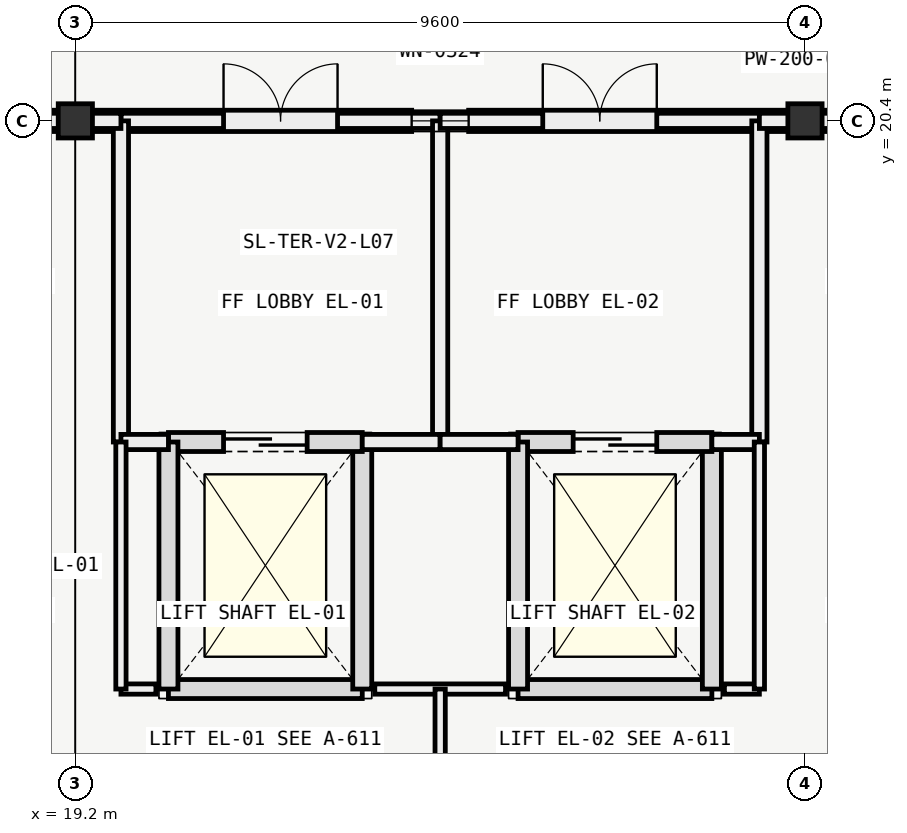
"""IFC4 building model, lengths in metres.
Left out: names, types, materials, properties, quantities, classifications, styles, units other than length and angle.
Written with IfcOpenShell. Run it as: python <this file> out.ifc"""

import sys

from ifc_helpers import new_model, si_unit, direction, frame, frame_2d, origin, origin_2d, place, context, subcontext, project, spatial, rectangle, extrude, element, fill, save


model = new_model("IFC4")
c1 = context("Model", 3, precision=1e-05, world=origin(), true_north=direction((0.0, 1.0)))
c2 = subcontext(c1, "Body", "Model", "MODEL_VIEW")
j1 = project(units=[si_unit("LENGTHUNIT", "METRE"), si_unit("PLANEANGLEUNIT", "RADIAN")], contexts=[c1])
p1 = place(None, origin())
s1 = spatial("IfcSite", under=j1, at=p1, CompositionType="ELEMENT")
p2 = place(p1, origin())
s2 = spatial("IfcBuilding", under=s1, at=p2, CompositionType="ELEMENT")
p3 = place(p2, frame((0.0, 0.0, 30.6)))
s3 = spatial("IfcBuildingStorey", under=s2, at=p3, CompositionType="ELEMENT", Elevation=30.6)
for number, where, z_axis, x_axis in (
    (1, (19.2, 20.4, 0.0), (0.0, 0.0, 1.0), (1.0, 0.0, 0.0)),
    (2, (28.8, 20.4, 0.0), (0.0, 0.0, 1.0), (1.0, 0.0, 0.0)),
):
    element("IfcColumn", number, at=place(p3, frame(where, z_axis=z_axis, x_axis=x_axis)), inside=s3, PredefinedType="COLUMN", context=c2, shape_type="SweptSolid", body=[
        extrude(rectangle(XDim=0.45, YDim=0.45, at=origin_2d()), origin(), (0.0, 0.0, 1.0), 4.2),
    ])
p4 = place(p3, frame((19.2, 20.4, 4.2), z_axis=(0.0, 0.0, 1.0), x_axis=(-1.0, 0.0, 0.0)))
e3 = element("IfcWall", 3, at=p4, inside=s3, PredefinedType="SOLIDWALL", context=c2, shape_type="SweptSolid", body=[
    extrude(rectangle(XDim=9.6, YDim=0.28, at=frame_2d((4.8, 0.0))), origin(), (0.0, 0.0, 1.0), 2.279),
])
p5 = place(p4, frame((4.425, 0.0, 0.25)))
e4 = element("IfcOpeningElement", 4, at=p5, cuts=e3, PredefinedType="OPENING", context=c2, shape_type="SweptSolid", body=[
    extrude(rectangle(XDim=0.75, YDim=1.1, at=frame_2d((0.375, 0.55))), frame((0.0, 0.15, 0.0), z_axis=(0.0, -1.0, 0.0), x_axis=(1.0, 0.0, 0.0)), (0.0, 0.0, 1.0), 0.3),
])
p6 = place(p3, frame((28.8, 20.4, 4.2), z_axis=(0.0, 0.0, 1.0), x_axis=(-1.0, 0.0, 0.0)))
e5 = element("IfcWall", 5, at=p6, inside=s3, PredefinedType="SOLIDWALL", context=c2, shape_type="SweptSolid", body=[
    extrude(rectangle(XDim=9.6, YDim=0.28, at=frame_2d((4.8, 0.0))), origin(), (0.0, 0.0, 1.0), 2.279),
])
p7 = place(p6, frame((4.425, 0.0, 0.25)))
e6 = element("IfcOpeningElement", 6, at=p7, cuts=e5, PredefinedType="OPENING", context=c2, shape_type="SweptSolid", body=[
    extrude(rectangle(XDim=0.75, YDim=1.1, at=frame_2d((0.375, 0.55))), frame((0.0, 0.15, 0.0), z_axis=(0.0, -1.0, 0.0), x_axis=(1.0, 0.0, 0.0)), (0.0, 0.0, 1.0), 0.3),
])
p8 = place(p3, frame((38.4, 20.4, 4.2), z_axis=(0.0, 0.0, 1.0), x_axis=(-1.0, 0.0, 0.0)))
e7 = element("IfcWall", 7, at=p8, inside=s3, PredefinedType="SOLIDWALL", context=c2, shape_type="SweptSolid", body=[
    extrude(rectangle(XDim=9.6, YDim=0.28, at=frame_2d((4.8, 0.0))), origin(), (0.0, 0.0, 1.0), 2.279),
])
p9 = place(p8, frame((4.425, 0.0, 0.25)))
e8 = element("IfcOpeningElement", 8, at=p9, cuts=e7, PredefinedType="OPENING", context=c2, shape_type="SweptSolid", body=[
    extrude(rectangle(XDim=0.75, YDim=1.1, at=frame_2d((0.375, 0.55))), frame((0.0, 0.15, 0.0), z_axis=(0.0, -1.0, 0.0), x_axis=(1.0, 0.0, 0.0)), (0.0, 0.0, 1.0), 0.3),
])
p10 = place(p3, frame((20.425, 12.925, 0.0), z_axis=(0.0, 0.0, 1.0), x_axis=(1.0, 0.0, 0.0)))
e9 = element("IfcWall", 9, at=p10, inside=s3, PredefinedType="SOLIDWALL", context=c2, shape_type="SweptSolid", body=[
    extrude(rectangle(XDim=2.55, YDim=0.25, at=frame_2d((1.275, 0.0))), origin(), (0.0, 0.0, 1.0), 3.4),
])
p11 = place(p3, frame((22.975, 12.925, 0.0), z_axis=(0.0, 0.0, 1.0), x_axis=(0.0, 1.0, 0.0)))
e10 = element("IfcWall", 10, at=p11, inside=s3, PredefinedType="SOLIDWALL", context=c2, shape_type="SweptSolid", body=[
    extrude(rectangle(XDim=3.25, YDim=0.25, at=frame_2d((1.625, 0.0))), origin(), (0.0, 0.0, 1.0), 3.4),
])
p12 = place(p3, frame((22.975, 16.175, 0.0), z_axis=(0.0, 0.0, 1.0), x_axis=(-1.0, 0.0, 0.0)))
e11 = element("IfcWall", 11, at=p12, inside=s3, PredefinedType="SOLIDWALL", context=c2, shape_type="SweptSolid", body=[
    extrude(rectangle(XDim=2.55, YDim=0.25, at=frame_2d((1.275, 0.0))), origin(), (0.0, 0.0, 1.0), 3.4),
])
p13 = place(p12, frame((0.725, 0.0, 0.0)))
e12 = element("IfcOpeningElement", 12, at=p13, cuts=e11, PredefinedType="OPENING", context=c2, shape_type="SweptSolid", body=[
    extrude(rectangle(XDim=1.1, YDim=2.1, at=frame_2d((0.55, 1.05))), frame((0.0, 0.135, 0.0), z_axis=(0.0, -1.0, 0.0), x_axis=(1.0, 0.0, 0.0)), (0.0, 0.0, 1.0), 0.27),
])
p14 = place(p3, frame((20.425, 16.175, 0.0), z_axis=(0.0, 0.0, 1.0), x_axis=(0.0, -1.0, 0.0)))
e13 = element("IfcWall", 13, at=p14, inside=s3, PredefinedType="SOLIDWALL", context=c2, shape_type="SweptSolid", body=[
    extrude(rectangle(XDim=3.25, YDim=0.25, at=frame_2d((1.625, 0.0))), origin(), (0.0, 0.0, 1.0), 3.4),
])
p15 = place(p3, frame((19.8, 20.4, 0.0), z_axis=(0.0, 0.0, 1.0), x_axis=(1.0, 0.0, 0.0)))
e14 = element("IfcWall", 14, at=p15, inside=s3, PredefinedType="PARTITIONING", context=c2, shape_type="SweptSolid", body=[
    extrude(rectangle(XDim=4.2, YDim=0.2, at=frame_2d((2.1, 0.0))), origin(), (0.0, 0.0, 1.0), 3.55),
])
p16 = place(p15, frame((1.35, 0.0, 0.0)))
e15 = element("IfcOpeningElement", 15, at=p16, cuts=e14, PredefinedType="OPENING", context=c2, shape_type="SweptSolid", body=[
    extrude(rectangle(XDim=1.5, YDim=2.2, at=frame_2d((0.75, 1.1))), frame((0.0, 0.11, 0.0), z_axis=(0.0, -1.0, 0.0), x_axis=(1.0, 0.0, 0.0)), (0.0, 0.0, 1.0), 0.22),
])
for number, where, z_axis, x_axis in (
    (16, (19.8, 16.175, 0.0), (0.0, 0.0, 1.0), (0.0, 1.0, 0.0)),
    (17, (24.0, 16.175, 0.0), (0.0, 0.0, 1.0), (0.0, 1.0, 0.0)),
):
    element("IfcWall", number, at=place(p3, frame(where, z_axis=z_axis, x_axis=x_axis)), inside=s3, PredefinedType="PARTITIONING", context=c2, shape_type="SweptSolid", body=[
        extrude(rectangle(XDim=4.225, YDim=0.2, at=frame_2d((2.112, 0.0))), origin(), (0.0, 0.0, 1.0), 3.55),
    ])
p17 = place(p3, frame((19.8, 16.175, 0.0), z_axis=(0.0, 0.0, 1.0), x_axis=(1.0, 0.0, 0.0)))
e18 = element("IfcWall", 18, at=p17, inside=s3, PredefinedType="PARTITIONING", context=c2, shape_type="SweptSolid", body=[
    extrude(rectangle(XDim=0.625, YDim=0.2, at=frame_2d((0.312, 0.0))), origin(), (0.0, 0.0, 1.0), 3.55),
])
p18 = place(p3, frame((22.975, 16.175, 0.0), z_axis=(0.0, 0.0, 1.0), x_axis=(1.0, 0.0, 0.0)))
e19 = element("IfcWall", 19, at=p18, inside=s3, PredefinedType="PARTITIONING", context=c2, shape_type="SweptSolid", body=[
    extrude(rectangle(XDim=1.025, YDim=0.2, at=frame_2d((0.512, 0.0))), origin(), (0.0, 0.0, 1.0), 3.55),
])
p19 = place(p3, frame((25.025, 12.925, 0.0), z_axis=(0.0, 0.0, 1.0), x_axis=(1.0, 0.0, 0.0)))
e20 = element("IfcWall", 20, at=p19, inside=s3, PredefinedType="SOLIDWALL", context=c2, shape_type="SweptSolid", body=[
    extrude(rectangle(XDim=2.55, YDim=0.25, at=frame_2d((1.275, 0.0))), origin(), (0.0, 0.0, 1.0), 3.4),
])
p20 = place(p3, frame((27.575, 12.925, 0.0), z_axis=(0.0, 0.0, 1.0), x_axis=(0.0, 1.0, 0.0)))
e21 = element("IfcWall", 21, at=p20, inside=s3, PredefinedType="SOLIDWALL", context=c2, shape_type="SweptSolid", body=[
    extrude(rectangle(XDim=3.25, YDim=0.25, at=frame_2d((1.625, 0.0))), origin(), (0.0, 0.0, 1.0), 3.4),
])
p21 = place(p3, frame((27.575, 16.175, 0.0), z_axis=(0.0, 0.0, 1.0), x_axis=(-1.0, 0.0, 0.0)))
e22 = element("IfcWall", 22, at=p21, inside=s3, PredefinedType="SOLIDWALL", context=c2, shape_type="SweptSolid", body=[
    extrude(rectangle(XDim=2.55, YDim=0.25, at=frame_2d((1.275, 0.0))), origin(), (0.0, 0.0, 1.0), 3.4),
])
p22 = place(p21, frame((0.725, 0.0, 0.0)))
e23 = element("IfcOpeningElement", 23, at=p22, cuts=e22, PredefinedType="OPENING", context=c2, shape_type="SweptSolid", body=[
    extrude(rectangle(XDim=1.1, YDim=2.1, at=frame_2d((0.55, 1.05))), frame((0.0, 0.135, 0.0), z_axis=(0.0, -1.0, 0.0), x_axis=(1.0, 0.0, 0.0)), (0.0, 0.0, 1.0), 0.27),
])
p23 = place(p3, frame((25.025, 16.175, 0.0), z_axis=(0.0, 0.0, 1.0), x_axis=(0.0, -1.0, 0.0)))
e24 = element("IfcWall", 24, at=p23, inside=s3, PredefinedType="SOLIDWALL", context=c2, shape_type="SweptSolid", body=[
    extrude(rectangle(XDim=3.25, YDim=0.25, at=frame_2d((1.625, 0.0))), origin(), (0.0, 0.0, 1.0), 3.4),
])
p24 = place(p3, frame((24.0, 20.4, 0.0), z_axis=(0.0, 0.0, 1.0), x_axis=(1.0, 0.0, 0.0)))
e25 = element("IfcWall", 25, at=p24, inside=s3, PredefinedType="PARTITIONING", context=c2, shape_type="SweptSolid", body=[
    extrude(rectangle(XDim=4.2, YDim=0.2, at=frame_2d((2.1, 0.0))), origin(), (0.0, 0.0, 1.0), 3.55),
])
p25 = place(p24, frame((1.35, 0.0, 0.0)))
e26 = element("IfcOpeningElement", 26, at=p25, cuts=e25, PredefinedType="OPENING", context=c2, shape_type="SweptSolid", body=[
    extrude(rectangle(XDim=1.5, YDim=2.2, at=frame_2d((0.75, 1.1))), frame((0.0, 0.11, 0.0), z_axis=(0.0, -1.0, 0.0), x_axis=(1.0, 0.0, 0.0)), (0.0, 0.0, 1.0), 0.22),
])
p26 = place(p3, frame((28.2, 16.175, 0.0), z_axis=(0.0, 0.0, 1.0), x_axis=(0.0, 1.0, 0.0)))
e27 = element("IfcWall", 27, at=p26, inside=s3, PredefinedType="PARTITIONING", context=c2, shape_type="SweptSolid", body=[
    extrude(rectangle(XDim=4.225, YDim=0.2, at=frame_2d((2.112, 0.0))), origin(), (0.0, 0.0, 1.0), 3.55),
])
p27 = place(p3, frame((24.0, 16.175, 0.0), z_axis=(0.0, 0.0, 1.0), x_axis=(1.0, 0.0, 0.0)))
e28 = element("IfcWall", 28, at=p27, inside=s3, PredefinedType="PARTITIONING", context=c2, shape_type="SweptSolid", body=[
    extrude(rectangle(XDim=1.025, YDim=0.2, at=frame_2d((0.512, 0.0))), origin(), (0.0, 0.0, 1.0), 3.55),
])
p28 = place(p3, frame((27.575, 16.175, 0.0), z_axis=(0.0, 0.0, 1.0), x_axis=(1.0, 0.0, 0.0)))
e29 = element("IfcWall", 29, at=p28, inside=s3, PredefinedType="PARTITIONING", context=c2, shape_type="SweptSolid", body=[
    extrude(rectangle(XDim=0.625, YDim=0.2, at=frame_2d((0.312, 0.0))), origin(), (0.0, 0.0, 1.0), 3.55),
])
p29 = place(p3, frame((19.8, 12.925, 0.0), z_axis=(0.0, 0.0, 1.0), x_axis=(1.0, 0.0, 0.0)))
e30 = element("IfcWall", 30, at=p29, inside=s3, PredefinedType="PARTITIONING", context=c2, shape_type="SweptSolid", body=[
    extrude(rectangle(XDim=0.46, YDim=0.135, at=frame_2d((0.23, 0.0))), origin(), (0.0, 0.0, 1.0), 3.85),
])
p30 = place(p3, frame((23.14, 12.925, 0.0), z_axis=(0.0, 0.0, 1.0), x_axis=(1.0, 0.0, 0.0)))
e31 = element("IfcWall", 31, at=p30, inside=s3, PredefinedType="PARTITIONING", context=c2, shape_type="SweptSolid", body=[
    extrude(rectangle(XDim=1.72, YDim=0.135, at=frame_2d((0.86, 0.0))), origin(), (0.0, 0.0, 1.0), 3.85),
])
p31 = place(p3, frame((27.74, 12.925, 0.0), z_axis=(0.0, 0.0, 1.0), x_axis=(1.0, 0.0, 0.0)))
e32 = element("IfcWall", 32, at=p31, inside=s3, PredefinedType="PARTITIONING", context=c2, shape_type="SweptSolid", body=[
    extrude(rectangle(XDim=0.46, YDim=0.135, at=frame_2d((0.23, 0.0))), origin(), (0.0, 0.0, 1.0), 3.85),
])
p32 = place(p3, frame((19.8, 12.925, 0.0), z_axis=(0.0, 0.0, 1.0), x_axis=(0.0, 1.0, 0.0)))
e33 = element("IfcWall", 33, at=p32, inside=s3, PredefinedType="PARTITIONING", context=c2, shape_type="SweptSolid", body=[
    extrude(rectangle(XDim=3.25, YDim=0.135, at=frame_2d((1.625, 0.0))), origin(), (0.0, 0.0, 1.0), 3.85),
])
p33 = place(p3, frame((16.89, 20.4, 0.0), z_axis=(0.0, 0.0, 1.0), x_axis=(1.0, 0.0, 0.0)))
e34 = element("IfcWall", 34, at=p33, inside=s3, PredefinedType="PARTITIONING", context=c2, shape_type="SweptSolid", body=[
    extrude(rectangle(XDim=2.91, YDim=0.2, at=frame_2d((1.455, 0.0))), origin(), (0.0, 0.0, 1.0), 3.63),
])
p34 = place(p33, frame((0.885, 0.0, 0.0)))
e35 = element("IfcOpeningElement", 35, at=p34, cuts=e34, PredefinedType="OPENING", context=c2, shape_type="SweptSolid", body=[
    extrude(rectangle(XDim=0.95, YDim=2.1, at=frame_2d((0.475, 1.05))), frame((0.0, 0.11, 0.0), z_axis=(0.0, -1.0, 0.0), x_axis=(1.0, 0.0, 0.0)), (0.0, 0.0, 1.0), 0.22),
])
p35 = place(p3, frame((24.0, 0.15, 0.0), z_axis=(0.0, 0.0, 1.0), x_axis=(0.0, 1.0, 0.0)))
e36 = element("IfcWall", 36, at=p35, inside=s3, PredefinedType="PARTITIONING", context=c2, shape_type="SweptSolid", body=[
    extrude(rectangle(XDim=12.775, YDim=0.135, at=frame_2d((6.388, 0.0))), origin(), (0.0, 0.0, 1.0), 3.85),
])
p36 = place(p3, frame((28.2, 12.925, 0.0), z_axis=(0.0, 0.0, 1.0), x_axis=(0.0, 1.0, 0.0)))
e37 = element("IfcWall", 37, at=p36, inside=s3, PredefinedType="PARTITIONING", context=c2, shape_type="SweptSolid", body=[
    extrude(rectangle(XDim=3.25, YDim=0.135, at=frame_2d((1.625, 0.0))), origin(), (0.0, 0.0, 1.0), 3.85),
])
p37 = place(p3, frame((28.2, 20.4, 0.0), z_axis=(0.0, 0.0, 1.0), x_axis=(1.0, 0.0, 0.0)))
e38 = element("IfcWall", 38, at=p37, inside=s3, PredefinedType="PARTITIONING", context=c2, shape_type="SweptSolid", body=[
    extrude(rectangle(XDim=3.11, YDim=0.2, at=frame_2d((1.555, 0.0))), origin(), (0.0, 0.0, 1.0), 3.63),
])
p38 = place(p37, frame((2.0, 0.0, 0.0)))
e39 = element("IfcOpeningElement", 39, at=p38, cuts=e38, PredefinedType="OPENING", context=c2, shape_type="SweptSolid", body=[
    extrude(rectangle(XDim=0.95, YDim=2.1, at=frame_2d((0.475, 1.05))), frame((0.0, 0.11, 0.0), z_axis=(0.0, -1.0, 0.0), x_axis=(1.0, 0.0, 0.0)), (0.0, 0.0, 1.0), 0.22),
])
p39 = place(p7, origin())
e40 = element("IfcWindow", 40, at=p39, inside=s3, PartitioningType="SINGLE_PANEL", PredefinedType="WINDOW", context=c2, shape_type="SweptSolid", body=[
    extrude(rectangle(XDim=0.75, YDim=1.1, at=frame_2d((0.375, 0.55))), frame((0.0, 0.03, 0.0), z_axis=(0.0, -1.0, 0.0), x_axis=(1.0, 0.0, 0.0)), (0.0, 0.0, 1.0), 0.06),
])
fill(e6, e40)
p40 = place(p13, origin())
e41 = element("IfcDoor", 41, at=p40, inside=s3, OperationType="SLIDING_TO_LEFT", PredefinedType="DOOR", context=c2, shape_type="SweptSolid", body=[
    extrude(rectangle(XDim=1.1, YDim=2.1, at=frame_2d((0.55, 1.05))), frame((0.0, 0.025, 0.0), z_axis=(0.0, -1.0, 0.0), x_axis=(1.0, 0.0, 0.0)), (0.0, 0.0, 1.0), 0.05),
])
fill(e12, e41)
p41 = place(p16, origin())
e42 = element("IfcDoor", 42, at=p41, inside=s3, OperationType="SINGLE_SWING_LEFT", PredefinedType="DOOR", context=c2, shape_type="SweptSolid", body=[
    extrude(rectangle(XDim=1.5, YDim=2.2, at=frame_2d((0.75, 1.1))), frame((0.0, 0.025, 0.0), z_axis=(0.0, -1.0, 0.0), x_axis=(1.0, 0.0, 0.0)), (0.0, 0.0, 1.0), 0.05),
])
fill(e15, e42)
p42 = place(p22, origin())
e43 = element("IfcDoor", 43, at=p42, inside=s3, OperationType="SLIDING_TO_LEFT", PredefinedType="DOOR", context=c2, shape_type="SweptSolid", body=[
    extrude(rectangle(XDim=1.1, YDim=2.1, at=frame_2d((0.55, 1.05))), frame((0.0, 0.025, 0.0), z_axis=(0.0, -1.0, 0.0), x_axis=(1.0, 0.0, 0.0)), (0.0, 0.0, 1.0), 0.05),
])
fill(e23, e43)
p43 = place(p25, origin())
e44 = element("IfcDoor", 44, at=p43, inside=s3, OperationType="SINGLE_SWING_LEFT", PredefinedType="DOOR", context=c2, shape_type="SweptSolid", body=[
    extrude(rectangle(XDim=1.5, YDim=2.2, at=frame_2d((0.75, 1.1))), frame((0.0, 0.025, 0.0), z_axis=(0.0, -1.0, 0.0), x_axis=(1.0, 0.0, 0.0)), (0.0, 0.0, 1.0), 0.05),
])
fill(e26, e44)
save(model, sys.argv[1])
